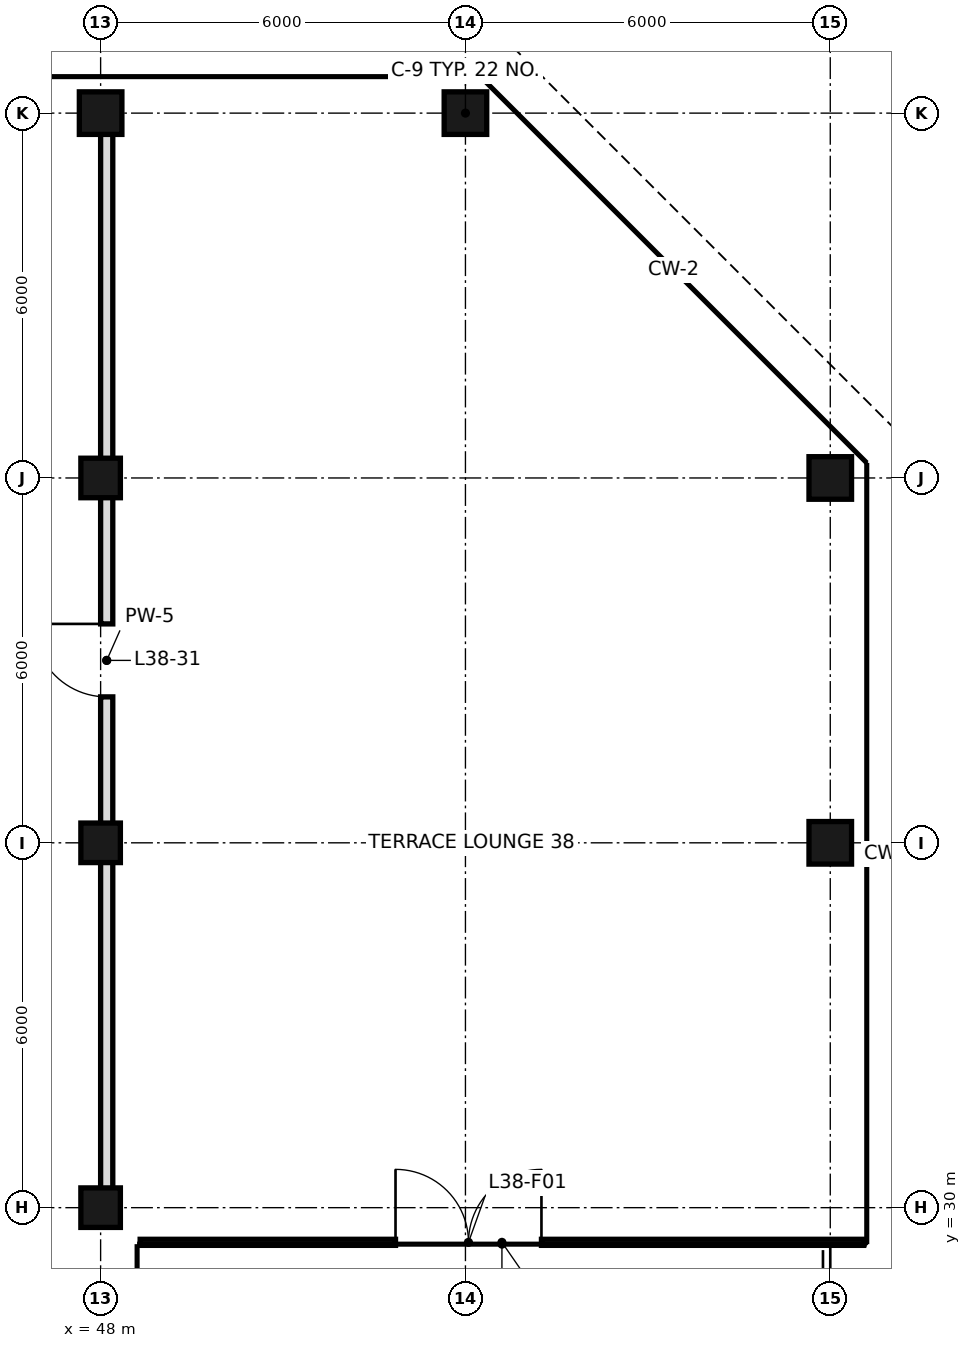
"""IFC4 building model, lengths in metres.
Left out: names, types, materials, properties, quantities, classifications, styles, units other than length and angle.
Written with IfcOpenShell. Run it as: python <this file> out.ifc"""

import sys

from ifc_helpers import new_model, si_unit, direction, frame, frame_2d, origin, origin_2d, place, context, subcontext, project, spatial, rectangle, hollow_rectangle, extrude, element, fill, save


model = new_model("IFC4")
c1 = context("Model", 3, precision=1e-05, world=origin(), true_north=direction((0.0, 1.0)))
c2 = subcontext(c1, "Body", "Model", "MODEL_VIEW")
j1 = project(units=[si_unit("LENGTHUNIT", "METRE"), si_unit("PLANEANGLEUNIT", "RADIAN")], contexts=[c1])
p1 = place(None, origin())
s1 = spatial("IfcSite", under=j1, at=p1, CompositionType="ELEMENT")
p2 = place(p1, origin())
s2 = spatial("IfcBuilding", under=s1, at=p2, CompositionType="ELEMENT")
p3 = place(p2, frame((0.0, 0.0, 167.2)))
s3 = spatial("IfcBuildingStorey", under=s2, at=p3, CompositionType="ELEMENT", Elevation=167.2)
for number, where, z_axis, x_axis in (
    (1, (48.0, 30.0, 0.0), (0.0, 0.0, 1.0), (1.0, 0.0, 0.0)),
    (2, (48.0, 36.0, 0.0), (0.0, 0.0, 1.0), (1.0, 0.0, 0.0)),
    (3, (48.0, 42.0, 0.0), (0.0, 0.0, 1.0), (1.0, 0.0, 0.0)),
):
    element("IfcColumn", number, at=place(p3, frame(where, z_axis=z_axis, x_axis=x_axis)), inside=s3, PredefinedType="COLUMN", context=c2, shape_type="SweptSolid", body=[
        extrude(hollow_rectangle(XDim=0.65, YDim=0.65, WallThickness=0.032, at=origin_2d()), origin(), (0.0, 0.0, 1.0), 3.6),
    ])
for number, where, z_axis, x_axis in (
    (4, (48.0, 48.0, 0.0), (0.0, 0.0, 1.0), (1.0, 0.0, 0.0)),
    (5, (54.0, 48.0, 0.0), (0.0, 0.0, 1.0), (1.0, 0.0, 0.0)),
    (6, (60.0, 36.0, 0.0), (0.0, 0.0, 1.0), (1.0, 0.0, 0.0)),
    (7, (60.0, 42.0, 0.0), (0.0, 0.0, 1.0), (1.0, 0.0, 0.0)),
):
    element("IfcColumn", number, at=place(p3, frame(where, z_axis=z_axis, x_axis=x_axis)), inside=s3, PredefinedType="COLUMN", context=c2, shape_type="SweptSolid", body=[
        extrude(hollow_rectangle(XDim=0.7, YDim=0.7, WallThickness=0.036, at=origin_2d()), origin(), (0.0, 0.0, 1.0), 3.6),
    ])
p4 = place(p3, frame((48.65, 29.43, 0.0), z_axis=(0.0, 0.0, 1.0), x_axis=(1.0, 0.0, 0.0)))
e8 = element("IfcWall", 8, at=p4, inside=s3, PredefinedType="SOLIDWALL", context=c2, shape_type="SweptSolid", body=[
    extrude(rectangle(XDim=11.9, YDim=0.1, at=frame_2d((5.95, 0.0))), origin(), (0.0, 0.0, 1.0), 3.42),
])
p5 = place(p4, frame((4.2, 0.0, 0.0)))
e9 = element("IfcOpeningElement", 9, at=p5, cuts=e8, PredefinedType="OPENING", context=c2, shape_type="SweptSolid", body=[
    extrude(rectangle(XDim=2.4, YDim=2.4, at=frame_2d((1.2, 1.2))), frame((0.0, 0.06, 0.0), z_axis=(0.0, -1.0, 0.0), x_axis=(1.0, 0.0, 0.0)), (0.0, 0.0, 1.0), 0.12),
])
p6 = place(p3, frame((48.1, 30.0, 0.0), z_axis=(0.0, 0.0, 1.0), x_axis=(0.0, 1.0, 0.0)))
e10 = element("IfcWall", 10, at=p6, inside=s3, PredefinedType="SOLIDWALL", context=c2, shape_type="SweptSolid", body=[
    extrude(rectangle(XDim=18.0, YDim=0.2, at=frame_2d((9.0, 0.0))), origin(), (0.0, 0.0, 1.0), 2.97),
])
p7 = place(p6, frame((8.4, 0.0, 0.0)))
e11 = element("IfcOpeningElement", 11, at=p7, cuts=e10, PredefinedType="OPENING", context=c2, shape_type="SweptSolid", body=[
    extrude(rectangle(XDim=1.2, YDim=2.4, at=frame_2d((0.6, 1.2))), frame((0.0, 0.11, 0.0), z_axis=(0.0, -1.0, 0.0), x_axis=(1.0, 0.0, 0.0)), (0.0, 0.0, 1.0), 0.22),
])
p8 = place(p5, origin())
e12 = element("IfcDoor", 12, at=p8, inside=s3, OperationType="DOUBLE_DOOR_SINGLE_SWING", PredefinedType="DOOR", context=c2, shape_type="SweptSolid", body=[
    extrude(rectangle(XDim=2.4, YDim=2.4, at=frame_2d((1.2, 1.2))), frame((0.0, 0.025, 0.0), z_axis=(0.0, -1.0, 0.0), x_axis=(1.0, 0.0, 0.0)), (0.0, 0.0, 1.0), 0.05),
])
fill(e9, e12)
p9 = place(p7, frame((1.2, 0.0, 0.0), z_axis=(0.0, 0.0, 1.0), x_axis=(-1.0, 0.0, 0.0)))
e13 = element("IfcDoor", 13, at=p9, inside=s3, OperationType="SINGLE_SWING_LEFT", PredefinedType="DOOR", context=c2, shape_type="SweptSolid", body=[
    extrude(rectangle(XDim=1.2, YDim=2.4, at=frame_2d((0.6, 1.2))), frame((0.0, 0.025, 0.0), z_axis=(0.0, -1.0, 0.0), x_axis=(1.0, 0.0, 0.0)), (0.0, 0.0, 1.0), 0.05),
])
fill(e11, e13)
save(model, sys.argv[1])
